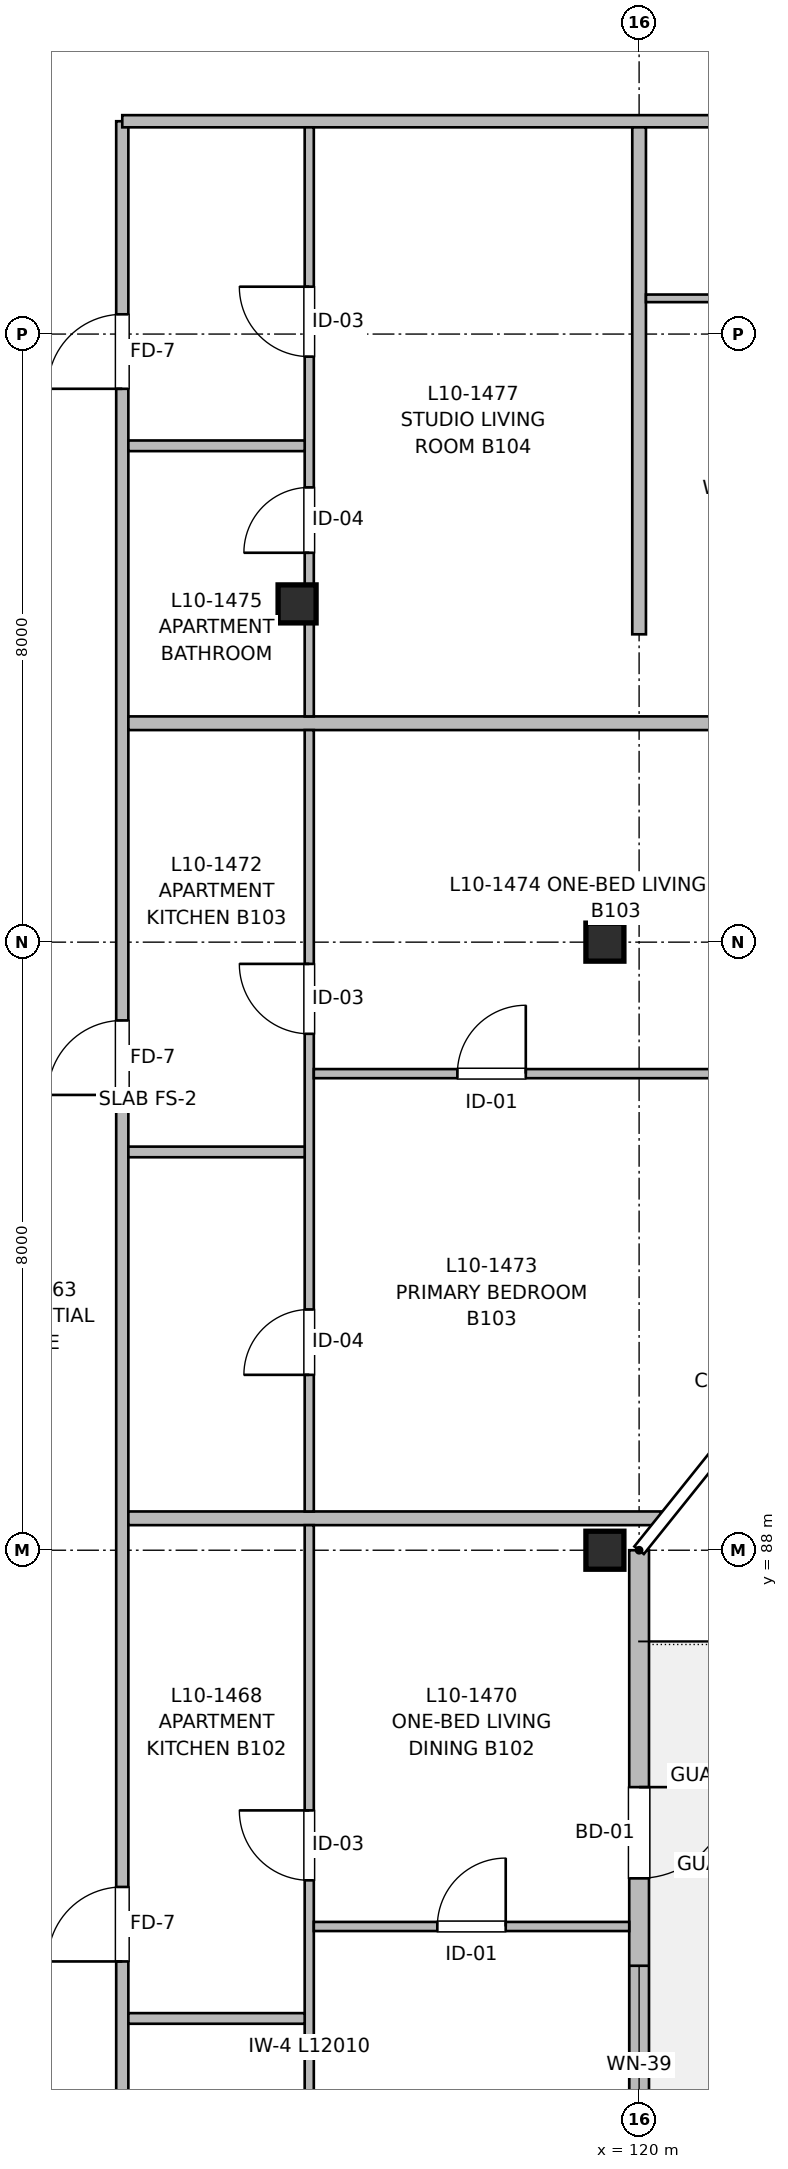
"""IFC4 building model, lengths in metres.
Left out: names, types, materials, properties, quantities, classifications, styles, units other than length and angle.
Written with IfcOpenShell. Run it as: python <this file> out.ifc"""

import sys

from ifc_helpers import new_model, si_unit, direction, frame, frame_2d, origin, origin_2d, place, context, subcontext, project, spatial, rectangle, extrude, element, fill, save


model = new_model("IFC4")
c1 = context("Model", 3, precision=1e-05, world=origin(), true_north=direction((0.0, 1.0)))
c2 = subcontext(c1, "Body", "Model", "MODEL_VIEW")
j1 = project(units=[si_unit("LENGTHUNIT", "METRE"), si_unit("PLANEANGLEUNIT", "RADIAN")], contexts=[c1])
p1 = place(None, origin())
s1 = spatial("IfcSite", under=j1, at=p1, CompositionType="ELEMENT")
p2 = place(p1, origin())
s2 = spatial("IfcBuilding", under=s1, at=p2, CompositionType="ELEMENT")
p3 = place(p2, frame((0.0, 0.0, 32.96)))
s3 = spatial("IfcBuildingStorey", under=s2, at=p3, CompositionType="ELEMENT", Elevation=32.96)
for number, where, z_axis, x_axis in (
    (1, (115.5, 100.45, 0.0), (0.0, 0.0, 1.0), (1.0, 0.0, 0.0)),
    (2, (119.55, 88.0, 0.0), (0.0, 0.0, 1.0), (1.0, 0.0, 0.0)),
    (3, (119.55, 96.0, 0.0), (0.0, 0.0, 1.0), (1.0, 0.0, 0.0)),
):
    element("IfcColumn", number, at=place(p3, frame(where, z_axis=z_axis, x_axis=x_axis)), inside=s3, PredefinedType="COLUMN", context=c2, shape_type="SweptSolid", body=[
        extrude(rectangle(XDim=0.5, YDim=0.5, at=origin_2d()), origin(), (0.0, 0.0, 1.0), 3.2),
    ])
p4 = place(p3, frame((120.0, 88.0, 0.0), z_axis=(0.0, 0.0, 1.0), x_axis=(0.0, -1.0, 0.0)))
e4 = element("IfcWall", 4, at=p4, inside=s3, PredefinedType="SOLIDWALL", context=c2, shape_type="SweptSolid", body=[
    extrude(rectangle(XDim=25.0, YDim=0.26, at=frame_2d((12.5, 0.0))), origin(), (0.0, 0.0, 1.0), 2.98),
])
p5 = place(p4, frame((3.117, 0.0, 0.0)))
e5 = element("IfcOpeningElement", 5, at=p5, cuts=e4, PredefinedType="OPENING", context=c2, shape_type="SweptSolid", body=[
    extrude(rectangle(XDim=1.2, YDim=2.2, at=frame_2d((0.6, 1.1))), frame((0.0, 0.14, 0.0), z_axis=(0.0, -1.0, 0.0), x_axis=(1.0, 0.0, 0.0)), (0.0, 0.0, 1.0), 0.28),
])
p6 = place(p4, frame((5.467, 0.0, 0.67)))
e6 = element("IfcOpeningElement", 6, at=p6, cuts=e4, PredefinedType="OPENING", context=c2, shape_type="SweptSolid", body=[
    extrude(rectangle(XDim=2.6, YDim=1.55, at=frame_2d((1.3, 0.775))), frame((0.0, 0.14, 0.0), z_axis=(0.0, -1.0, 0.0), x_axis=(1.0, 0.0, 0.0)), (0.0, 0.0, 1.0), 0.28),
])
p7 = place(p4, frame((12.325, 0.0, 0.87)))
e7 = element("IfcOpeningElement", 7, at=p7, cuts=e4, PredefinedType="OPENING", context=c2, shape_type="SweptSolid", body=[
    extrude(rectangle(XDim=1.25, YDim=1.35, at=frame_2d((0.625, 0.675))), frame((0.0, 0.14, 0.0), z_axis=(0.0, -1.0, 0.0), x_axis=(1.0, 0.0, 0.0)), (0.0, 0.0, 1.0), 0.28),
])
p8 = place(p4, frame((20.183, 0.0, 0.82)))
e8 = element("IfcOpeningElement", 8, at=p8, cuts=e4, PredefinedType="OPENING", context=c2, shape_type="SweptSolid", body=[
    extrude(rectangle(XDim=1.3, YDim=1.4, at=frame_2d((0.65, 0.7))), frame((0.0, 0.14, 0.0), z_axis=(0.0, -1.0, 0.0), x_axis=(1.0, 0.0, 0.0)), (0.0, 0.0, 1.0), 0.28),
])
p9 = place(p3, frame((113.2, 63.16, 0.0), z_axis=(0.0, 0.0, 1.0), x_axis=(0.0, 1.0, 0.0)))
e9 = element("IfcWall", 9, at=p9, inside=s3, PredefinedType="PARTITIONING", context=c2, shape_type="SweptSolid", body=[
    extrude(rectangle(XDim=43.64, YDim=0.16, at=frame_2d((21.82, 0.0))), origin(), (0.0, 0.0, 1.0), 2.935),
])
p10 = place(p9, frame((5.74, 0.0, 0.0)))
e10 = element("IfcOpeningElement", 10, at=p10, cuts=e9, PredefinedType="OPENING", context=c2, shape_type="SweptSolid", body=[
    extrude(rectangle(XDim=1.5, YDim=2.2, at=frame_2d((0.75, 1.1))), frame((0.0, 0.09, 0.0), z_axis=(0.0, -1.0, 0.0), x_axis=(1.0, 0.0, 0.0)), (0.0, 0.0, 1.0), 0.18),
])
p11 = place(p9, frame((19.43, 0.0, 0.0)))
e11 = element("IfcOpeningElement", 11, at=p11, cuts=e9, PredefinedType="OPENING", context=c2, shape_type="SweptSolid", body=[
    extrude(rectangle(XDim=0.98, YDim=2.15, at=frame_2d((0.49, 1.075))), frame((0.0, 0.09, 0.0), z_axis=(0.0, -1.0, 0.0), x_axis=(1.0, 0.0, 0.0)), (0.0, 0.0, 1.0), 0.18),
])
p12 = place(p9, frame((30.83, 0.0, 0.0)))
e12 = element("IfcOpeningElement", 12, at=p12, cuts=e9, PredefinedType="OPENING", context=c2, shape_type="SweptSolid", body=[
    extrude(rectangle(XDim=0.98, YDim=2.15, at=frame_2d((0.49, 1.075))), frame((0.0, 0.09, 0.0), z_axis=(0.0, -1.0, 0.0), x_axis=(1.0, 0.0, 0.0)), (0.0, 0.0, 1.0), 0.18),
])
p13 = place(p9, frame((40.12, 0.0, 0.0)))
e13 = element("IfcOpeningElement", 13, at=p13, cuts=e9, PredefinedType="OPENING", context=c2, shape_type="SweptSolid", body=[
    extrude(rectangle(XDim=0.98, YDim=2.15, at=frame_2d((0.49, 1.075))), frame((0.0, 0.09, 0.0), z_axis=(0.0, -1.0, 0.0), x_axis=(1.0, 0.0, 0.0)), (0.0, 0.0, 1.0), 0.18),
])
p14 = place(p3, frame((113.2, 106.8, 0.0), z_axis=(0.0, 0.0, 1.0), x_axis=(1.0, 0.0, 0.0)))
e14 = element("IfcWall", 14, at=p14, inside=s3, PredefinedType="PARTITIONING", context=c2, shape_type="SweptSolid", body=[
    extrude(rectangle(XDim=24.14, YDim=0.16, at=frame_2d((12.07, 0.0))), origin(), (0.0, 0.0, 1.0), 2.935),
])
p15 = place(p14, frame((19.575, 0.0, 0.0)))
e15 = element("IfcOpeningElement", 15, at=p15, cuts=e14, PredefinedType="OPENING", context=c2, shape_type="SweptSolid", body=[
    extrude(rectangle(XDim=1.05, YDim=2.15, at=frame_2d((0.525, 1.075))), frame((0.0, 0.09, 0.0), z_axis=(0.0, -1.0, 0.0), x_axis=(1.0, 0.0, 0.0)), (0.0, 0.0, 1.0), 0.18),
])
p16 = place(p14, frame((8.995, 0.0, 0.0)))
e16 = element("IfcOpeningElement", 16, at=p16, cuts=e14, PredefinedType="OPENING", context=c2, shape_type="SweptSolid", body=[
    extrude(rectangle(XDim=0.98, YDim=2.15, at=frame_2d((0.49, 1.075))), frame((0.0, 0.09, 0.0), z_axis=(0.0, -1.0, 0.0), x_axis=(1.0, 0.0, 0.0)), (0.0, 0.0, 1.0), 0.18),
])
p17 = place(p3, frame((120.0, 100.05, 0.0), z_axis=(0.0, 0.0, 1.0), x_axis=(0.0, 1.0, 0.0)))
e17 = element("IfcWall", 17, at=p17, inside=s3, PredefinedType="PARTITIONING", context=c2, shape_type="SweptSolid", body=[
    extrude(rectangle(XDim=6.67, YDim=0.18, at=frame_2d((3.335, 0.0))), origin(), (0.0, 0.0, 1.0), 2.935),
])
p18 = place(p3, frame((113.28, 88.42, 0.0), z_axis=(0.0, 0.0, 1.0), x_axis=(1.0, 0.0, 0.0)))
e18 = element("IfcWall", 18, at=p18, inside=s3, PredefinedType="PARTITIONING", context=c2, shape_type="SweptSolid", body=[
    extrude(rectangle(XDim=7.006, YDim=0.18, at=frame_2d((3.503, 0.0))), origin(), (0.0, 0.0, 1.0), 2.935),
])
p19 = place(p3, frame((113.28, 98.88, 0.0), z_axis=(0.0, 0.0, 1.0), x_axis=(1.0, 0.0, 0.0)))
e19 = element("IfcWall", 19, at=p19, inside=s3, PredefinedType="PARTITIONING", context=c2, shape_type="SweptSolid", body=[
    extrude(rectangle(XDim=17.26, YDim=0.18, at=frame_2d((8.63, 0.0))), origin(), (0.0, 0.0, 1.0), 2.935),
])
p20 = place(p3, frame((115.66, 76.32, 0.0), z_axis=(0.0, 0.0, 1.0), x_axis=(0.0, 1.0, 0.0)))
e20 = element("IfcWall", 20, at=p20, inside=s3, PredefinedType="PARTITIONING", context=c2, shape_type="SweptSolid", body=[
    extrude(rectangle(XDim=12.01, YDim=0.12, at=frame_2d((6.005, 0.0))), origin(), (0.0, 0.0, 1.0), 2.935),
])
p21 = place(p20, frame((2.098, 0.0, 0.0)))
e21 = element("IfcOpeningElement", 21, at=p21, cuts=e20, PredefinedType="OPENING", context=c2, shape_type="SweptSolid", body=[
    extrude(rectangle(XDim=0.86, YDim=2.1, at=frame_2d((0.43, 1.05))), frame((0.0, 0.07, 0.0), z_axis=(0.0, -1.0, 0.0), x_axis=(1.0, 0.0, 0.0)), (0.0, 0.0, 1.0), 0.14),
])
p22 = place(p20, frame((7.337, 0.0, 0.0)))
e22 = element("IfcOpeningElement", 22, at=p22, cuts=e20, PredefinedType="OPENING", context=c2, shape_type="SweptSolid", body=[
    extrude(rectangle(XDim=0.92, YDim=2.1, at=frame_2d((0.46, 1.05))), frame((0.0, 0.07, 0.0), z_axis=(0.0, -1.0, 0.0), x_axis=(1.0, 0.0, 0.0)), (0.0, 0.0, 1.0), 0.14),
])
p23 = place(p3, frame((113.28, 81.84, 0.0), z_axis=(0.0, 0.0, 1.0), x_axis=(1.0, 0.0, 0.0)))
e23 = element("IfcWall", 23, at=p23, inside=s3, PredefinedType="PARTITIONING", context=c2, shape_type="SweptSolid", body=[
    extrude(rectangle(XDim=2.32, YDim=0.14, at=frame_2d((1.16, 0.0))), origin(), (0.0, 0.0, 1.0), 2.935),
])
p24 = place(p3, frame((115.72, 83.05, 0.0), z_axis=(0.0, 0.0, 1.0), x_axis=(1.0, 0.0, 0.0)))
e24 = element("IfcWall", 24, at=p24, inside=s3, PredefinedType="PARTITIONING", context=c2, shape_type="SweptSolid", body=[
    extrude(rectangle(XDim=4.15, YDim=0.12, at=frame_2d((2.075, 0.0))), origin(), (0.0, 0.0, 1.0), 2.935),
])
p25 = place(p24, frame((1.625, 0.0, 0.0)))
e25 = element("IfcOpeningElement", 25, at=p25, cuts=e24, PredefinedType="OPENING", context=c2, shape_type="SweptSolid", body=[
    extrude(rectangle(XDim=0.9, YDim=2.1, at=frame_2d((0.45, 1.05))), frame((0.0, 0.07, 0.0), z_axis=(0.0, -1.0, 0.0), x_axis=(1.0, 0.0, 0.0)), (0.0, 0.0, 1.0), 0.14),
])
p26 = place(p3, frame((115.66, 88.51, 0.0), z_axis=(0.0, 0.0, 1.0), x_axis=(0.0, 1.0, 0.0)))
e26 = element("IfcWall", 26, at=p26, inside=s3, PredefinedType="PARTITIONING", context=c2, shape_type="SweptSolid", body=[
    extrude(rectangle(XDim=10.28, YDim=0.12, at=frame_2d((5.14, 0.0))), origin(), (0.0, 0.0, 1.0), 2.935),
])
p27 = place(p26, frame((1.797, 0.0, 0.0)))
e27 = element("IfcOpeningElement", 27, at=p27, cuts=e26, PredefinedType="OPENING", context=c2, shape_type="SweptSolid", body=[
    extrude(rectangle(XDim=0.86, YDim=2.1, at=frame_2d((0.43, 1.05))), frame((0.0, 0.07, 0.0), z_axis=(0.0, -1.0, 0.0), x_axis=(1.0, 0.0, 0.0)), (0.0, 0.0, 1.0), 0.14),
])
p28 = place(p26, frame((6.284, 0.0, 0.0)))
e28 = element("IfcOpeningElement", 28, at=p28, cuts=e26, PredefinedType="OPENING", context=c2, shape_type="SweptSolid", body=[
    extrude(rectangle(XDim=0.92, YDim=2.1, at=frame_2d((0.46, 1.05))), frame((0.0, 0.07, 0.0), z_axis=(0.0, -1.0, 0.0), x_axis=(1.0, 0.0, 0.0)), (0.0, 0.0, 1.0), 0.14),
])
p29 = place(p3, frame((113.28, 93.24, 0.0), z_axis=(0.0, 0.0, 1.0), x_axis=(1.0, 0.0, 0.0)))
e29 = element("IfcWall", 29, at=p29, inside=s3, PredefinedType="PARTITIONING", context=c2, shape_type="SweptSolid", body=[
    extrude(rectangle(XDim=2.32, YDim=0.14, at=frame_2d((1.16, 0.0))), origin(), (0.0, 0.0, 1.0), 2.935),
])
p30 = place(p3, frame((115.72, 94.27, 0.0), z_axis=(0.0, 0.0, 1.0), x_axis=(1.0, 0.0, 0.0)))
e30 = element("IfcWall", 30, at=p30, inside=s3, PredefinedType="PARTITIONING", context=c2, shape_type="SweptSolid", body=[
    extrude(rectangle(XDim=9.617, YDim=0.12, at=frame_2d((4.809, 0.0))), origin(), (0.0, 0.0, 1.0), 2.935),
])
p31 = place(p30, frame((1.889, 0.0, 0.0)))
e31 = element("IfcOpeningElement", 31, at=p31, cuts=e30, PredefinedType="OPENING", context=c2, shape_type="SweptSolid", body=[
    extrude(rectangle(XDim=0.9, YDim=2.1, at=frame_2d((0.45, 1.05))), frame((0.0, 0.07, 0.0), z_axis=(0.0, -1.0, 0.0), x_axis=(1.0, 0.0, 0.0)), (0.0, 0.0, 1.0), 0.14),
])
p32 = place(p3, frame((115.66, 98.97, 0.0), z_axis=(0.0, 0.0, 1.0), x_axis=(0.0, 1.0, 0.0)))
e32 = element("IfcWall", 32, at=p32, inside=s3, PredefinedType="PARTITIONING", context=c2, shape_type="SweptSolid", body=[
    extrude(rectangle(XDim=7.75, YDim=0.12, at=frame_2d((3.875, 0.0))), origin(), (0.0, 0.0, 1.0), 2.68),
])
p33 = place(p32, frame((2.153, 0.0, 0.0)))
e33 = element("IfcOpeningElement", 33, at=p33, cuts=e32, PredefinedType="OPENING", context=c2, shape_type="SweptSolid", body=[
    extrude(rectangle(XDim=0.86, YDim=2.1, at=frame_2d((0.43, 1.05))), frame((0.0, 0.07, 0.0), z_axis=(0.0, -1.0, 0.0), x_axis=(1.0, 0.0, 0.0)), (0.0, 0.0, 1.0), 0.14),
])
p34 = place(p32, frame((4.733, 0.0, 0.0)))
e34 = element("IfcOpeningElement", 34, at=p34, cuts=e32, PredefinedType="OPENING", context=c2, shape_type="SweptSolid", body=[
    extrude(rectangle(XDim=0.92, YDim=2.1, at=frame_2d((0.46, 1.05))), frame((0.0, 0.07, 0.0), z_axis=(0.0, -1.0, 0.0), x_axis=(1.0, 0.0, 0.0)), (0.0, 0.0, 1.0), 0.14),
])
p35 = place(p3, frame((113.28, 102.53, 0.0), z_axis=(0.0, 0.0, 1.0), x_axis=(1.0, 0.0, 0.0)))
e35 = element("IfcWall", 35, at=p35, inside=s3, PredefinedType="PARTITIONING", context=c2, shape_type="SweptSolid", body=[
    extrude(rectangle(XDim=2.32, YDim=0.14, at=frame_2d((1.16, 0.0))), origin(), (0.0, 0.0, 1.0), 2.935),
])
p36 = place(p3, frame((120.09, 104.47, 0.0), z_axis=(0.0, 0.0, 1.0), x_axis=(1.0, 0.0, 0.0)))
e36 = element("IfcWall", 36, at=p36, inside=s3, PredefinedType="PARTITIONING", context=c2, shape_type="SweptSolid", body=[
    extrude(rectangle(XDim=5.13, YDim=0.1, at=frame_2d((2.565, 0.0))), origin(), (0.0, 0.0, 1.0), 2.935),
])
p37 = place(p36, frame((2.18, 0.0, 0.0)))
e37 = element("IfcOpeningElement", 37, at=p37, cuts=e36, PredefinedType="OPENING", context=c2, shape_type="SweptSolid", body=[
    extrude(rectangle(XDim=0.92, YDim=2.1, at=frame_2d((0.46, 1.05))), frame((0.0, 0.06, 0.0), z_axis=(0.0, -1.0, 0.0), x_axis=(1.0, 0.0, 0.0)), (0.0, 0.0, 1.0), 0.12),
])
p38 = place(p5, origin())
e38 = element("IfcDoor", 38, at=p38, inside=s3, OperationType="SINGLE_SWING_LEFT", PredefinedType="DOOR", context=c2, shape_type="SweptSolid", body=[
    extrude(rectangle(XDim=1.2, YDim=2.2, at=frame_2d((0.6, 1.1))), frame((0.0, 0.025, 0.0), z_axis=(0.0, -1.0, 0.0), x_axis=(1.0, 0.0, 0.0)), (0.0, 0.0, 1.0), 0.05),
])
fill(e5, e38)
p39 = place(p6, origin())
e39 = element("IfcWindow", 39, at=p39, inside=s3, PartitioningType="SINGLE_PANEL", PredefinedType="WINDOW", context=c2, shape_type="SweptSolid", body=[
    extrude(rectangle(XDim=2.6, YDim=1.55, at=frame_2d((1.3, 0.775))), frame((0.0, 0.03, 0.0), z_axis=(0.0, -1.0, 0.0), x_axis=(1.0, 0.0, 0.0)), (0.0, 0.0, 1.0), 0.06),
])
fill(e6, e39)
p40 = place(p22, origin())
e40 = element("IfcDoor", 40, at=p40, inside=s3, OperationType="SINGLE_SWING_RIGHT", PredefinedType="DOOR", context=c2, shape_type="SweptSolid", body=[
    extrude(rectangle(XDim=0.92, YDim=2.1, at=frame_2d((0.46, 1.05))), frame((0.0, 0.025, 0.0), z_axis=(0.0, -1.0, 0.0), x_axis=(1.0, 0.0, 0.0)), (0.0, 0.0, 1.0), 0.05),
])
fill(e22, e40)
p41 = place(p11, origin())
e41 = element("IfcDoor", 41, at=p41, inside=s3, OperationType="SINGLE_SWING_LEFT", PredefinedType="DOOR", context=c2, shape_type="SweptSolid", body=[
    extrude(rectangle(XDim=0.98, YDim=2.15, at=frame_2d((0.49, 1.075))), frame((0.0, 0.025, 0.0), z_axis=(0.0, -1.0, 0.0), x_axis=(1.0, 0.0, 0.0)), (0.0, 0.0, 1.0), 0.05),
])
fill(e11, e41)
p42 = place(p25, origin())
e42 = element("IfcDoor", 42, at=p42, inside=s3, OperationType="SINGLE_SWING_RIGHT", PredefinedType="DOOR", context=c2, shape_type="SweptSolid", body=[
    extrude(rectangle(XDim=0.9, YDim=2.1, at=frame_2d((0.45, 1.05))), frame((0.0, 0.025, 0.0), z_axis=(0.0, -1.0, 0.0), x_axis=(1.0, 0.0, 0.0)), (0.0, 0.0, 1.0), 0.05),
])
fill(e25, e42)
p43 = place(p27, origin())
e43 = element("IfcDoor", 43, at=p43, inside=s3, OperationType="SINGLE_SWING_LEFT", PredefinedType="DOOR", context=c2, shape_type="SweptSolid", body=[
    extrude(rectangle(XDim=0.86, YDim=2.1, at=frame_2d((0.43, 1.05))), frame((0.0, 0.025, 0.0), z_axis=(0.0, -1.0, 0.0), x_axis=(1.0, 0.0, 0.0)), (0.0, 0.0, 1.0), 0.05),
])
fill(e27, e43)
p44 = place(p28, origin())
e44 = element("IfcDoor", 44, at=p44, inside=s3, OperationType="SINGLE_SWING_RIGHT", PredefinedType="DOOR", context=c2, shape_type="SweptSolid", body=[
    extrude(rectangle(XDim=0.92, YDim=2.1, at=frame_2d((0.46, 1.05))), frame((0.0, 0.025, 0.0), z_axis=(0.0, -1.0, 0.0), x_axis=(1.0, 0.0, 0.0)), (0.0, 0.0, 1.0), 0.05),
])
fill(e28, e44)
p45 = place(p12, origin())
e45 = element("IfcDoor", 45, at=p45, inside=s3, OperationType="SINGLE_SWING_LEFT", PredefinedType="DOOR", context=c2, shape_type="SweptSolid", body=[
    extrude(rectangle(XDim=0.98, YDim=2.15, at=frame_2d((0.49, 1.075))), frame((0.0, 0.025, 0.0), z_axis=(0.0, -1.0, 0.0), x_axis=(1.0, 0.0, 0.0)), (0.0, 0.0, 1.0), 0.05),
])
fill(e12, e45)
p46 = place(p31, origin())
e46 = element("IfcDoor", 46, at=p46, inside=s3, OperationType="SINGLE_SWING_RIGHT", PredefinedType="DOOR", context=c2, shape_type="SweptSolid", body=[
    extrude(rectangle(XDim=0.9, YDim=2.1, at=frame_2d((0.45, 1.05))), frame((0.0, 0.025, 0.0), z_axis=(0.0, -1.0, 0.0), x_axis=(1.0, 0.0, 0.0)), (0.0, 0.0, 1.0), 0.05),
])
fill(e31, e46)
p47 = place(p33, origin())
e47 = element("IfcDoor", 47, at=p47, inside=s3, OperationType="SINGLE_SWING_LEFT", PredefinedType="DOOR", context=c2, shape_type="SweptSolid", body=[
    extrude(rectangle(XDim=0.86, YDim=2.1, at=frame_2d((0.43, 1.05))), frame((0.0, 0.025, 0.0), z_axis=(0.0, -1.0, 0.0), x_axis=(1.0, 0.0, 0.0)), (0.0, 0.0, 1.0), 0.05),
])
fill(e33, e47)
p48 = place(p34, origin())
e48 = element("IfcDoor", 48, at=p48, inside=s3, OperationType="SINGLE_SWING_RIGHT", PredefinedType="DOOR", context=c2, shape_type="SweptSolid", body=[
    extrude(rectangle(XDim=0.92, YDim=2.1, at=frame_2d((0.46, 1.05))), frame((0.0, 0.025, 0.0), z_axis=(0.0, -1.0, 0.0), x_axis=(1.0, 0.0, 0.0)), (0.0, 0.0, 1.0), 0.05),
])
fill(e34, e48)
p49 = place(p13, origin())
e49 = element("IfcDoor", 49, at=p49, inside=s3, OperationType="SINGLE_SWING_LEFT", PredefinedType="DOOR", context=c2, shape_type="SweptSolid", body=[
    extrude(rectangle(XDim=0.98, YDim=2.15, at=frame_2d((0.49, 1.075))), frame((0.0, 0.025, 0.0), z_axis=(0.0, -1.0, 0.0), x_axis=(1.0, 0.0, 0.0)), (0.0, 0.0, 1.0), 0.05),
])
fill(e13, e49)
save(model, sys.argv[1])
